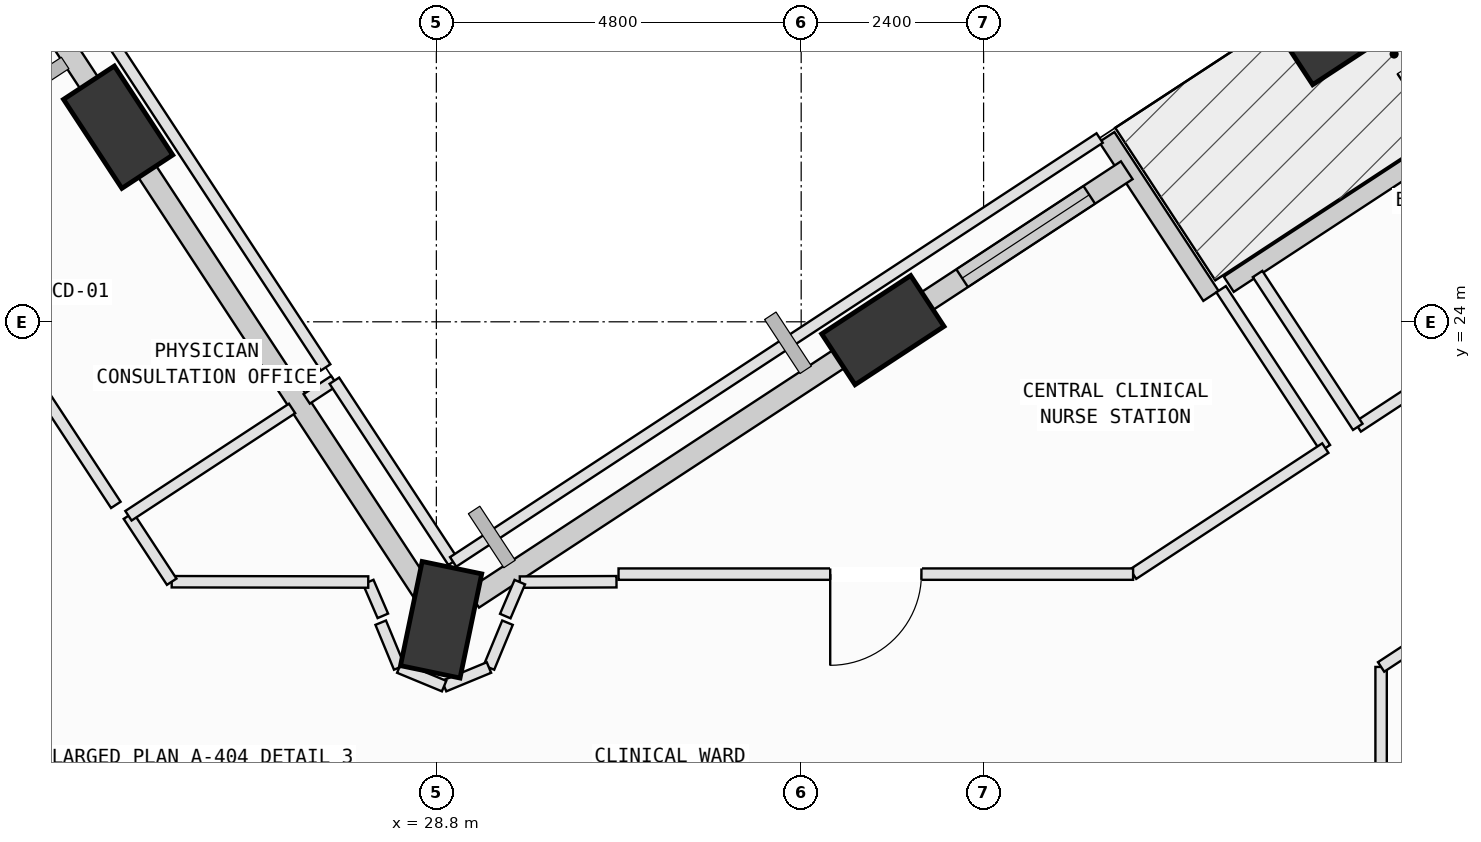
"""IFC4 building model, lengths in metres.
Left out: names, types, materials, properties, quantities, classifications, styles, units other than length and angle.
Written with IfcOpenShell. Run it as: python <this file> out.ifc"""

import sys

from ifc_helpers import new_model, si_unit, direction, frame, frame_2d, origin, origin_2d, place, context, subcontext, project, spatial, rectangle, extrude, element, fill, save


model = new_model("IFC4")
c1 = context("Model", 3, precision=1e-05, world=origin(), true_north=direction((0.0, 1.0)))
c2 = subcontext(c1, "Body", "Model", "MODEL_VIEW")
j1 = project(units=[si_unit("LENGTHUNIT", "METRE"), si_unit("PLANEANGLEUNIT", "RADIAN")], contexts=[c1])
p1 = place(None, origin())
s1 = spatial("IfcSite", under=j1, at=p1, CompositionType="ELEMENT")
p2 = place(p1, origin())
s2 = spatial("IfcBuilding", under=s1, at=p2, CompositionType="ELEMENT")
p3 = place(p2, frame((0.0, 0.0, 165.8)))
s3 = spatial("IfcBuildingStorey", under=s2, at=p3, CompositionType="ELEMENT", Elevation=165.8)
p4 = place(p3, frame((40.696, 27.838, 0.002), z_axis=(-0.012883611471, 0.029308689603, 0.999487375243), x_axis=(-0.545052318334, -0.838218249125, 0.017553834713)))
e1 = element("IfcColumn", 1, at=p4, inside=s3, PredefinedType="COLUMN", context=c2, shape_type="SweptSolid", body=[
    extrude(rectangle(XDim=1.4, YDim=0.8, at=origin_2d()), origin(), (0.0, 0.0, 1.0), 3.998),
])
p5 = place(p3, frame((34.675, 23.89, 0.002), z_axis=(0.003726493364, 0.004459574025, 0.999983112581), x_axis=(-0.99330109932, 0.115510919824, 0.003186454268)))
e2 = element("IfcColumn", 2, at=p5, inside=s3, PredefinedType="COLUMN", context=c2, shape_type="SweptSolid", body=[
    extrude(rectangle(XDim=1.4, YDim=0.8, at=origin_2d()), origin(), (0.0, 0.0, 1.0), 3.996),
])
p6 = place(p3, frame((28.863, 20.08, 0.002), z_axis=(0.019724836791, -0.019480566367, 0.99961564531), x_axis=(-0.553225254665, 0.832589411518, 0.027142023308)))
e3 = element("IfcColumn", 3, at=p6, inside=s3, PredefinedType="COLUMN", context=c2, shape_type="SweptSolid", body=[
    extrude(rectangle(XDim=1.4, YDim=0.8, at=origin_2d()), origin(), (0.0, 0.0, 1.0), 3.998),
])
p7 = place(p3, frame((24.613, 26.561, 0.002), z_axis=(-0.007020412857, -0.037299758743, 0.999279461313), x_axis=(-0.384257200508, 0.922680288149, 0.031740978557)))
e4 = element("IfcColumn", 4, at=p7, inside=s3, PredefinedType="COLUMN", context=c2, shape_type="SweptSolid", body=[
    extrude(rectangle(XDim=1.4, YDim=0.8, at=origin_2d()), origin(), (0.0, 0.0, 1.0), 3.999),
])
p8 = place(p3, frame((39.226, 24.494, 0.0), z_axis=(0.0, 0.0, 1.0), x_axis=(0.83628365525, 0.548297043547, 0.0)))
e5 = element("IfcWall", 5, at=p8, inside=s3, PredefinedType="SOLIDWALL", context=c2, shape_type="SweptSolid", body=[
    extrude(rectangle(XDim=6.96, YDim=0.24, at=frame_2d((3.48, 0.0))), origin(), (0.0, 0.0, 1.0), 3.045),
])
p9 = place(p8, frame((3.375, 0.0, 0.0)))
e6 = element("IfcOpeningElement", 6, at=p9, cuts=e5, PredefinedType="OPENING", context=c2, shape_type="SweptSolid", body=[
    extrude(rectangle(XDim=1.1, YDim=2.15, at=frame_2d((0.55, 1.075))), frame((0.0, 0.13, 0.0), z_axis=(0.0, -1.0, 0.0), x_axis=(1.0, 0.0, 0.0)), (0.0, 0.0, 1.0), 0.26),
])
p10 = place(p3, frame((37.621, 26.432, 0.0), z_axis=(0.0, 0.0, 1.0), x_axis=(0.548306585328, -0.836277399244, 0.0)))
e7 = element("IfcWall", 7, at=p10, inside=s3, PredefinedType="SOLIDWALL", context=c2, shape_type="SweptSolid", body=[
    extrude(rectangle(XDim=2.5, YDim=0.24, at=frame_2d((1.25, 0.0))), origin(), (0.0, 0.0, 1.0), 3.165),
])
p11 = place(p3, frame((35.099, 24.168, 0.0), z_axis=(0.0, 0.0, 1.0), x_axis=(0.836267517438, 0.548321656765, 0.0)))
e8 = element("IfcWall", 8, at=p11, inside=s3, PredefinedType="SOLIDWALL", context=c2, shape_type="SweptSolid", body=[
    extrude(rectangle(XDim=3.33, YDim=0.28, at=frame_2d((1.665, 0.0))), origin(), (0.0, 0.0, 1.0), 3.145),
])
p12 = place(p11, frame((0.74, 0.0, 0.75)))
e9 = element("IfcOpeningElement", 9, at=p12, cuts=e8, PredefinedType="OPENING", context=c2, shape_type="SweptSolid", body=[
    extrude(rectangle(XDim=2.0, YDim=1.95, at=frame_2d((1.0, 0.975))), frame((0.0, 0.15, 0.0), z_axis=(0.0, -1.0, 0.0), x_axis=(1.0, 0.0, 0.0)), (0.0, 0.0, 1.0), 0.3),
])
p13 = place(p3, frame((29.285, 20.356, 0.0), z_axis=(0.0, 0.0, 1.0), x_axis=(0.836260995497, 0.548331603513, 0.0)))
e10 = element("IfcWall", 10, at=p13, inside=s3, PredefinedType="SOLIDWALL", context=c2, shape_type="SweptSolid", body=[
    extrude(rectangle(XDim=5.96, YDim=0.28, at=frame_2d((2.98, 0.0))), origin(), (0.0, 0.0, 1.0), 3.165),
])
p14 = place(p3, frame((28.62, 20.449, 0.0), z_axis=(0.0, 0.0, 1.0), x_axis=(-0.548274567117, 0.836298391158, 0.0)))
e11 = element("IfcWall", 11, at=p14, inside=s3, PredefinedType="SOLIDWALL", context=c2, shape_type="SweptSolid", body=[
    extrude(rectangle(XDim=6.76, YDim=0.28, at=frame_2d((3.38, 0.0))), origin(), (0.0, 0.0, 1.0), 3.165),
])
p15 = place(p3, frame((24.373, 26.928, 0.0), z_axis=(0.0, 0.0, 1.0), x_axis=(-0.548310186412, 0.836275038176, 0.0)))
e12 = element("IfcWall", 12, at=p15, inside=s3, PredefinedType="SOLIDWALL", context=c2, shape_type="SweptSolid", body=[
    extrude(rectangle(XDim=6.223, YDim=0.28, at=frame_2d((3.111, 0.0))), origin(), (0.0, 0.0, 1.0), 3.165),
])
p16 = place(p15, frame((3.211, 0.0, 0.75)))
e13 = element("IfcOpeningElement", 13, at=p16, cuts=e12, PredefinedType="OPENING", context=c2, shape_type="SweptSolid", body=[
    extrude(rectangle(XDim=1.2, YDim=1.75, at=frame_2d((0.6, 0.875))), frame((0.0, 0.15, 0.0), z_axis=(0.0, -1.0, 0.0), x_axis=(1.0, 0.0, 0.0)), (0.0, 0.0, 1.0), 0.3),
])
p17 = place(p3, frame((41.23, 17.95, 0.0), z_axis=(0.0, 0.0, 1.0), x_axis=(0.0, 1.0, 0.0)))
e14 = element("IfcWall", 14, at=p17, inside=s3, PredefinedType="PARTITIONING", context=c2, shape_type="SweptSolid", body=[
    extrude(rectangle(XDim=1.509, YDim=0.15, at=frame_2d((0.754, 0.0))), origin(), (0.0, 0.0, 1.0), 3.78),
])
p18 = place(p3, frame((41.23, 19.459, 0.0), z_axis=(0.0, 0.0, 1.0), x_axis=(0.836287739874, 0.548290813471, 0.0)))
e15 = element("IfcWall", 15, at=p18, inside=s3, PredefinedType="PARTITIONING", context=c2, shape_type="SweptSolid", body=[
    extrude(rectangle(XDim=6.812, YDim=0.15, at=frame_2d((3.406, 0.0))), origin(), (0.0, 0.0, 1.0), 3.065),
])
p19 = place(p18, frame((2.806, 0.0, 0.0)))
e16 = element("IfcOpeningElement", 16, at=p19, cuts=e15, PredefinedType="OPENING", context=c2, shape_type="SweptSolid", body=[
    extrude(rectangle(XDim=1.2, YDim=2.15, at=frame_2d((0.6, 1.075))), frame((0.0, 0.085, 0.0), z_axis=(0.0, -1.0, 0.0), x_axis=(1.0, 0.0, 0.0)), (0.0, 0.0, 1.0), 0.17),
])
p20 = place(p3, frame((31.17, 20.58, 0.0), z_axis=(0.0, 0.0, 1.0), x_axis=(-0.999991876787, -0.00403067743, 0.0)))
e17 = element("IfcWall", 17, at=p20, inside=s3, PredefinedType="PARTITIONING", context=c2, shape_type="SweptSolid", body=[
    extrude(rectangle(XDim=1.272, YDim=0.15, at=frame_2d((0.636, 0.0))), origin(), (0.0, 0.0, 1.0), 3.78),
])
p21 = place(p3, frame((29.898, 20.575, 0.0), z_axis=(0.0, 0.0, 1.0), x_axis=(-0.392767255378, -0.919637908692, 0.0)))
e18 = element("IfcWall", 18, at=p21, inside=s3, PredefinedType="PARTITIONING", context=c2, shape_type="SweptSolid", body=[
    extrude(rectangle(XDim=0.486, YDim=0.15, at=frame_2d((0.243, 0.0))), origin(), (0.0, 0.0, 1.0), 3.78),
])
p22 = place(p3, frame((29.736, 20.041, 0.0), z_axis=(0.0, 0.0, 1.0), x_axis=(-0.382306769343, -0.924035461503, 0.0)))
e19 = element("IfcWall", 19, at=p22, inside=s3, PredefinedType="PARTITIONING", context=c2, shape_type="SweptSolid", body=[
    extrude(rectangle(XDim=0.639, YDim=0.15, at=frame_2d((0.319, 0.0))), origin(), (0.0, 0.0, 1.0), 3.78),
])
p23 = place(p3, frame((29.492, 19.451, 0.0), z_axis=(0.0, 0.0, 1.0), x_axis=(-0.924114659462, -0.382115291723, 0.0)))
e20 = element("IfcWall", 20, at=p23, inside=s3, PredefinedType="PARTITIONING", context=c2, shape_type="SweptSolid", body=[
    extrude(rectangle(XDim=0.638, YDim=0.15, at=frame_2d((0.319, 0.0))), origin(), (0.0, 0.0, 1.0), 3.415),
])
for number, where, z_axis, x_axis in (
    (21, (28.902, 19.207, 0.0), (0.0, 0.0, 1.0), (-0.924, 0.382, 0.0)),
    (22, (28.312, 19.451, 0.0), (0.0, 0.0, 1.0), (-0.382, 0.924, 0.0)),
):
    element("IfcWall", number, at=place(p3, frame(where, z_axis=z_axis, x_axis=x_axis)), inside=s3, PredefinedType="PARTITIONING", context=c2, shape_type="SweptSolid", body=[
        extrude(rectangle(XDim=0.638, YDim=0.15, at=frame_2d((0.319, 0.0))), origin(), (0.0, 0.0, 1.0), 3.78),
    ])
p24 = place(p3, frame((28.096, 20.131, 0.0), z_axis=(0.0, 0.0, 1.0), x_axis=(-0.396107773703, 0.918204025047, 0.0)))
e23 = element("IfcWall", 23, at=p24, inside=s3, PredefinedType="PARTITIONING", context=c2, shape_type="SweptSolid", body=[
    extrude(rectangle(XDim=0.484, YDim=0.15, at=frame_2d((0.242, 0.0))), origin(), (0.0, 0.0, 1.0), 3.78),
])
p25 = place(p3, frame((27.904, 20.576, 0.0), z_axis=(0.0, 0.0, 1.0), x_axis=(-0.999998712014, 0.001604982827, 0.0)))
e24 = element("IfcWall", 24, at=p25, inside=s3, PredefinedType="PARTITIONING", context=c2, shape_type="SweptSolid", body=[
    extrude(rectangle(XDim=2.586, YDim=0.15, at=frame_2d((1.293, 0.0))), origin(), (0.0, 0.0, 1.0), 3.78),
])
p26 = place(p3, frame((25.318, 20.58, 0.0), z_axis=(0.0, 0.0, 1.0), x_axis=(-0.548332691365, 0.836260282197, 0.0)))
e25 = element("IfcWall", 25, at=p26, inside=s3, PredefinedType="PARTITIONING", context=c2, shape_type="SweptSolid", body=[
    extrude(rectangle(XDim=1.038, YDim=0.15, at=frame_2d((0.519, 0.0))), origin(), (0.0, 0.0, 1.0), 3.415),
])
p27 = place(p3, frame((24.749, 21.448, 0.0), z_axis=(0.0, 0.0, 1.0), x_axis=(0.836198746425, 0.548426527874, 0.0)))
e26 = element("IfcWall", 26, at=p27, inside=s3, PredefinedType="PARTITIONING", context=c2, shape_type="SweptSolid", body=[
    extrude(rectangle(XDim=2.575, YDim=0.15, at=frame_2d((1.288, 0.0))), origin(), (0.0, 0.0, 1.0), 3.78),
])
p28 = place(p3, frame((27.094, 22.986, 0.0), z_axis=(0.0, 0.0, 1.0), x_axis=(0.835911265281, 0.548864606781, 0.0)))
e27 = element("IfcWall", 27, at=p28, inside=s3, PredefinedType="PARTITIONING", context=c2, shape_type="SweptSolid", body=[
    extrude(rectangle(XDim=0.436, YDim=0.15, at=frame_2d((0.218, 0.0))), origin(), (0.0, 0.0, 1.0), 3.78),
])
p29 = place(p3, frame((27.458, 23.225, 0.0), z_axis=(0.0, 0.0, 1.0), x_axis=(0.548280379418, -0.836294580603, 0.0)))
e28 = element("IfcWall", 28, at=p29, inside=s3, PredefinedType="PARTITIONING", context=c2, shape_type="SweptSolid", body=[
    extrude(rectangle(XDim=2.851, YDim=0.15, at=frame_2d((1.425, 0.0))), origin(), (0.0, 0.0, 1.0), 3.78),
])
p30 = place(p3, frame((29.021, 20.841, 0.0), z_axis=(0.0, 0.0, 1.0), x_axis=(0.836283520449, 0.54829724915, 0.0)))
e29 = element("IfcWall", 29, at=p30, inside=s3, PredefinedType="PARTITIONING", context=c2, shape_type="SweptSolid", body=[
    extrude(rectangle(XDim=10.171, YDim=0.15, at=frame_2d((5.086, 0.0))), origin(), (0.0, 0.0, 1.0), 3.78),
])
p31 = place(p3, frame((39.125, 24.429, 0.0), z_axis=(0.0, 0.0, 1.0), x_axis=(0.548330098424, -0.836261982373, 0.0)))
e30 = element("IfcWall", 30, at=p31, inside=s3, PredefinedType="PARTITIONING", context=c2, shape_type="SweptSolid", body=[
    extrude(rectangle(XDim=2.5, YDim=0.15, at=frame_2d((1.25, 0.0))), origin(), (0.0, 0.0, 1.0), 3.78),
])
p32 = place(p3, frame((40.496, 22.338, 0.0), z_axis=(0.0, 0.0, 1.0), x_axis=(-0.836310513297, -0.548256076436, 0.0)))
e31 = element("IfcWall", 31, at=p32, inside=s3, PredefinedType="PARTITIONING", context=c2, shape_type="SweptSolid", body=[
    extrude(rectangle(XDim=3.024, YDim=0.15, at=frame_2d((1.512, 0.0))), origin(), (0.0, 0.0, 1.0), 3.045),
])
p33 = place(p3, frame((37.967, 20.68, 0.0), z_axis=(0.0, 0.0, 1.0), x_axis=(-1.0, 0.0, 0.0)))
e32 = element("IfcWall", 32, at=p33, inside=s3, PredefinedType="PARTITIONING", context=c2, shape_type="SweptSolid", body=[
    extrude(rectangle(XDim=6.77, YDim=0.15, at=frame_2d((3.385, 0.0))), origin(), (0.0, 0.0, 1.0), 3.415),
])
p34 = place(p33, frame((2.785, 0.0, 0.0)))
e33 = element("IfcOpeningElement", 33, at=p34, cuts=e32, PredefinedType="OPENING", context=c2, shape_type="SweptSolid", body=[
    extrude(rectangle(XDim=1.2, YDim=2.15, at=frame_2d((0.6, 1.075))), frame((0.0, 0.085, 0.0), z_axis=(0.0, -1.0, 0.0), x_axis=(1.0, 0.0, 0.0)), (0.0, 0.0, 1.0), 0.17),
])
p35 = place(p3, frame((49.979, 28.555, 0.0), z_axis=(0.0, 0.0, 1.0), x_axis=(-0.836298938049, -0.548273732927, 0.0)))
e34 = element("IfcWall", 34, at=p35, inside=s3, PredefinedType="PARTITIONING", context=c2, shape_type="SweptSolid", body=[
    extrude(rectangle(XDim=10.829, YDim=0.15, at=frame_2d((5.414, 0.0))), origin(), (0.0, 0.0, 1.0), 3.78),
])
p36 = place(p35, frame((4.814, 0.0, 0.0)))
e35 = element("IfcOpeningElement", 35, at=p36, cuts=e34, PredefinedType="OPENING", context=c2, shape_type="SweptSolid", body=[
    extrude(rectangle(XDim=1.2, YDim=2.15, at=frame_2d((0.6, 1.075))), frame((0.0, 0.085, 0.0), z_axis=(0.0, -1.0, 0.0), x_axis=(1.0, 0.0, 0.0)), (0.0, 0.0, 1.0), 0.17),
])
p37 = place(p3, frame((40.923, 22.618, 0.0), z_axis=(0.0, 0.0, 1.0), x_axis=(-0.548192826292, 0.836351974471, 0.0)))
e36 = element("IfcWall", 36, at=p37, inside=s3, PredefinedType="PARTITIONING", context=c2, shape_type="SweptSolid", body=[
    extrude(rectangle(XDim=2.405, YDim=0.15, at=frame_2d((1.202, 0.0))), origin(), (0.0, 0.0, 1.0), 3.78),
])
p38 = place(p3, frame((24.583, 21.591, 0.0), z_axis=(0.0, 0.0, 1.0), x_axis=(-0.548247074475, 0.8363164146, 0.0)))
e37 = element("IfcWall", 37, at=p38, inside=s3, PredefinedType="PARTITIONING", context=c2, shape_type="SweptSolid", body=[
    extrude(rectangle(XDim=5.655, YDim=0.15, at=frame_2d((2.827, 0.0))), origin(), (0.0, 0.0, 1.0), 3.415),
])
p39 = place(p38, frame((2.327, 0.0, 0.0)))
e38 = element("IfcOpeningElement", 38, at=p39, cuts=e37, PredefinedType="OPENING", context=c2, shape_type="SweptSolid", body=[
    extrude(rectangle(XDim=1.0, YDim=2.12, at=frame_2d((0.5, 1.06))), frame((0.0, 0.085, 0.0), z_axis=(0.0, -1.0, 0.0), x_axis=(1.0, 0.0, 0.0)), (0.0, 0.0, 1.0), 0.17),
])
p40 = place(p3, frame((24.243, 28.129, 0.0), z_axis=(0.0, 0.0, 1.0), x_axis=(0.548247074475, -0.8363164146, 0.0)))
e39 = element("IfcWall", 39, at=p40, inside=s3, PredefinedType="PARTITIONING", context=c2, shape_type="SweptSolid", body=[
    extrude(rectangle(XDim=5.655, YDim=0.15, at=frame_2d((2.827, 0.0))), origin(), (0.0, 0.0, 1.0), 3.78),
])
p41 = place(p12, origin())
e40 = element("IfcWindow", 40, at=p41, inside=s3, PartitioningType="SINGLE_PANEL", PredefinedType="WINDOW", context=c2, shape_type="SweptSolid", body=[
    extrude(rectangle(XDim=2.0, YDim=1.95, at=frame_2d((1.0, 0.975))), frame((0.0, 0.03, 0.0), z_axis=(0.0, -1.0, 0.0), x_axis=(1.0, 0.0, 0.0)), (0.0, 0.0, 1.0), 0.06),
])
fill(e9, e40)
p42 = place(p34, origin())
e41 = element("IfcDoor", 41, at=p42, inside=s3, OperationType="SINGLE_SWING_RIGHT", PredefinedType="DOOR", context=c2, shape_type="SweptSolid", body=[
    extrude(rectangle(XDim=1.2, YDim=2.15, at=frame_2d((0.6, 1.075))), frame((0.0, 0.025, 0.0), z_axis=(0.0, -1.0, 0.0), x_axis=(1.0, 0.0, 0.0)), (0.0, 0.0, 1.0), 0.05),
])
fill(e33, e41)
save(model, sys.argv[1])
